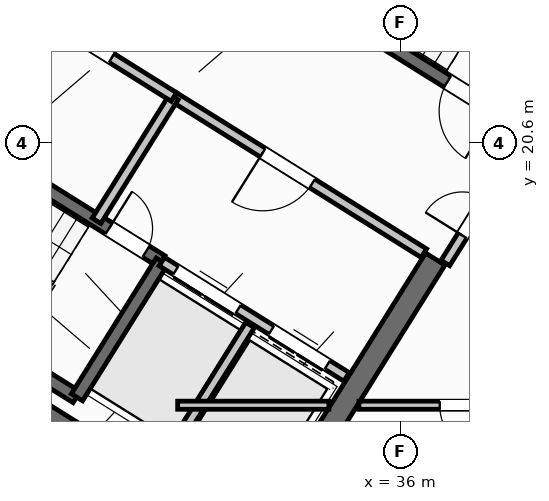
"""IFC4 building model, lengths in metres.
Left out: names, types, materials, properties, quantities, classifications, styles, units other than length and angle.
Written with IfcOpenShell. Run it as: python <this file> out.ifc"""

import sys

from ifc_helpers import new_model, si_unit, direction, frame, frame_2d, origin, place, context, subcontext, project, spatial, rectangle, extrude, source, transform, mapped, element, fill, save


model = new_model("IFC4")
c1 = context("Model", 3, precision=1e-05, world=origin(), true_north=direction((0.0, 1.0)))
c2 = subcontext(c1, "Body", "Model", "MODEL_VIEW")
j1 = project(units=[si_unit("LENGTHUNIT", "METRE"), si_unit("PLANEANGLEUNIT", "RADIAN")], contexts=[c1])
p1 = place(None, origin())
s1 = spatial("IfcSite", under=j1, at=p1, CompositionType="ELEMENT")
p2 = place(p1, origin())
s2 = spatial("IfcBuilding", under=s1, at=p2, CompositionType="ELEMENT")
p3 = place(p2, frame((0.0, 0.0, 291.6)))
s3 = spatial("IfcBuildingStorey", under=s2, at=p3, CompositionType="ELEMENT", Elevation=291.6)
p4 = place(p3, frame((33.324, 12.503, 0.0), z_axis=(0.0, 0.0, 1.0), x_axis=(-0.848043529849, 0.529926571782, 0.0)))
e1 = element("IfcWall", 1, at=p4, inside=s3, PredefinedType="SHEAR", context=c2, shape_type="SweptSolid", body=[
    extrude(rectangle(XDim=13.04, YDim=0.45, at=frame_2d((6.52, 0.0))), origin(), (0.0, 0.0, 1.0), 3.35),
])
p5 = place(p3, frame((36.683, 18.304, 0.0), z_axis=(0.0, 0.0, 1.0), x_axis=(-0.529904039071, -0.848057609704, 0.0)))
e2 = element("IfcWall", 2, at=p5, inside=s3, PredefinedType="SHEAR", context=c2, shape_type="SweptSolid", body=[
    extrude(rectangle(XDim=6.475, YDim=0.45, at=frame_2d((3.238, 0.0))), origin(), (0.0, 0.0, 1.0), 3.35),
])
p6 = place(p3, frame((29.268, 6.429, 0.0), z_axis=(0.0, 0.0, 1.0), x_axis=(-0.848048398186, 0.529918780885, 0.0)))
e3 = element("IfcWall", 3, at=p6, inside=s3, PredefinedType="STANDARD", context=c2, shape_type="SweptSolid", body=[
    extrude(rectangle(XDim=25.188, YDim=0.32, at=frame_2d((12.594, 0.0))), origin(), (0.0, 0.0, 1.0), 3.35),
])
p7 = place(p6, frame((16.362, 0.0, 0.0)))
e4 = element("IfcOpeningElement", 4, at=p7, cuts=e3, PredefinedType="OPENING", context=c2, shape_type="SweptSolid", body=[
    extrude(rectangle(XDim=1.2, YDim=2.15, at=frame_2d((0.6, 1.075))), frame((0.0, 0.17, 0.0), z_axis=(0.0, -1.0, 0.0), x_axis=(1.0, 0.0, 0.0)), (0.0, 0.0, 1.0), 0.34),
])
p8 = place(p6, frame((3.859, 0.0, 0.9)))
e5 = element("IfcOpeningElement", 5, at=p8, cuts=e3, PredefinedType="OPENING", context=c2, shape_type="SweptSolid", body=[
    extrude(rectangle(XDim=1.65, YDim=1.45, at=frame_2d((0.825, 0.725))), frame((0.0, 0.17, 0.0), z_axis=(0.0, -1.0, 0.0), x_axis=(1.0, 0.0, 0.0)), (0.0, 0.0, 1.0), 0.34),
])
p9 = place(p6, frame((10.519, 0.0, 0.9)))
e6 = element("IfcOpeningElement", 6, at=p9, cuts=e3, PredefinedType="OPENING", context=c2, shape_type="SweptSolid", body=[
    extrude(rectangle(XDim=1.65, YDim=1.45, at=frame_2d((0.825, 0.725))), frame((0.0, 0.17, 0.0), z_axis=(0.0, -1.0, 0.0), x_axis=(1.0, 0.0, 0.0)), (0.0, 0.0, 1.0), 0.34),
])
p10 = place(p6, frame((21.156, 0.0, 0.95)))
e7 = element("IfcOpeningElement", 7, at=p10, cuts=e3, PredefinedType="OPENING", context=c2, shape_type="SweptSolid", body=[
    extrude(rectangle(XDim=1.95, YDim=1.35, at=frame_2d((0.975, 0.675))), frame((0.0, 0.17, 0.0), z_axis=(0.0, -1.0, 0.0), x_axis=(1.0, 0.0, 0.0)), (0.0, 0.0, 1.0), 0.34),
])
p11 = place(p3, frame((29.605, 15.581, 0.0), z_axis=(0.0, 0.0, 1.0), x_axis=(-0.848036911448, 0.529937163087, 0.0)))
e8 = element("IfcWall", 8, at=p11, inside=s3, PredefinedType="SHEAR", context=c2, shape_type="SweptSolid", body=[
    extrude(rectangle(XDim=7.46, YDim=0.26, at=frame_2d((3.73, 0.0))), origin(), (0.0, 0.0, 1.0), 3.35),
])
p12 = place(p3, frame((31.28, 18.261, 0.0), z_axis=(0.0, 0.0, 1.0), x_axis=(-0.848051618787, 0.529913626805, 0.0)))
e9 = element("IfcWall", 9, at=p12, inside=s3, PredefinedType="SHEAR", context=c2, shape_type="SweptSolid", body=[
    extrude(rectangle(XDim=7.46, YDim=0.26, at=frame_2d((3.73, 0.0))), origin(), (0.0, 0.0, 1.0), 3.35),
])
p13 = place(p12, frame((0.36, 0.0, 0.0)))
e10 = element("IfcOpeningElement", 10, at=p13, cuts=e9, PredefinedType="OPENING", context=c2, shape_type="SweptSolid", body=[
    extrude(rectangle(XDim=0.86, YDim=2.05, at=frame_2d((0.43, 1.025))), frame((0.0, 0.14, 0.0), z_axis=(0.0, -1.0, 0.0), x_axis=(1.0, 0.0, 0.0)), (0.0, 0.0, 1.0), 0.28),
])
p14 = place(p3, frame((31.288, 18.256, 0.0), z_axis=(0.0, 0.0, 1.0), x_axis=(-0.529943379326, -0.848033026897, 0.0)))
e11 = element("IfcWall", 11, at=p14, inside=s3, PredefinedType="SHEAR", context=c2, shape_type="SweptSolid", body=[
    extrude(rectangle(XDim=3.16, YDim=0.26, at=frame_2d((1.58, 0.0))), origin(), (0.0, 0.0, 1.0), 3.35),
])
p15 = place(p3, frame((38.046, 21.108, 0.0), z_axis=(0.0, 0.0, 1.0), x_axis=(-0.848054434086, 0.529909121291, 0.0)))
e12 = element("IfcWall", 12, at=p15, inside=s3, PredefinedType="SHEAR", context=c2, shape_type="SweptSolid", body=[
    extrude(rectangle(XDim=7.33, YDim=0.26, at=frame_2d((3.665, 0.0))), origin(), (0.0, 0.0, 1.0), 3.35),
])
p16 = place(p15, frame((0.22, 0.0, 0.0)))
e13 = element("IfcOpeningElement", 13, at=p16, cuts=e12, PredefinedType="OPENING", context=c2, shape_type="SweptSolid", body=[
    extrude(rectangle(XDim=1.1, YDim=2.1, at=frame_2d((0.55, 1.05))), frame((0.0, 0.14, 0.0), z_axis=(0.0, -1.0, 0.0), x_axis=(1.0, 0.0, 0.0)), (0.0, 0.0, 1.0), 0.28),
])
p17 = place(p3, frame((34.933, 15.978, 0.0), z_axis=(0.0, 0.0, 1.0), x_axis=(-0.848055739377, 0.529907032327, 0.0)))
e14 = element("IfcWall", 14, at=p17, inside=s3, PredefinedType="STANDARD", context=c2, shape_type="SweptSolid", body=[
    extrude(rectangle(XDim=4.298, YDim=0.2, at=frame_2d((2.149, 0.0))), origin(), (0.0, 0.0, 1.0), 3.34),
])
p18 = place(p17, frame((0.448, 0.0, 0.0)))
e15 = element("IfcOpeningElement", 15, at=p18, cuts=e14, PredefinedType="OPENING", context=c2, shape_type="SweptSolid", body=[
    extrude(rectangle(XDim=1.3, YDim=2.2, at=frame_2d((0.65, 1.1))), frame((0.0, 0.11, 0.0), z_axis=(0.0, -1.0, 0.0), x_axis=(1.0, 0.0, 0.0)), (0.0, 0.0, 1.0), 0.22),
])
p19 = place(p17, frame((2.523, 0.0, 0.0)))
e16 = element("IfcOpeningElement", 16, at=p19, cuts=e14, PredefinedType="OPENING", context=c2, shape_type="SweptSolid", body=[
    extrude(rectangle(XDim=1.45, YDim=2.25, at=frame_2d((0.725, 1.125))), frame((0.0, 0.11, 0.0), z_axis=(0.0, -1.0, 0.0), x_axis=(1.0, 0.0, 0.0)), (0.0, 0.0, 1.0), 0.22),
])
p20 = place(p3, frame((36.459, 18.421, 0.0), z_axis=(0.0, 0.0, 1.0), x_axis=(-0.848059591691, 0.529900867089, 0.0)))
e17 = element("IfcWall", 17, at=p20, inside=s3, PredefinedType="STANDARD", context=c2, shape_type="SweptSolid", body=[
    extrude(rectangle(XDim=5.818, YDim=0.2, at=frame_2d((2.909, 0.0))), origin(), (0.0, 0.0, 1.0), 3.34),
])
p21 = place(p20, frame((2.598, 0.0, 0.0)))
e18 = element("IfcOpeningElement", 18, at=p21, cuts=e17, PredefinedType="OPENING", context=c2, shape_type="SweptSolid", body=[
    extrude(rectangle(XDim=1.15, YDim=2.1, at=frame_2d((0.575, 1.05))), frame((0.0, 0.11, 0.0), z_axis=(0.0, -1.0, 0.0), x_axis=(1.0, 0.0, 0.0)), (0.0, 0.0, 1.0), 0.22),
])
p22 = place(p3, frame((33.029, 17.003, 0.0), z_axis=(0.0, 0.0, 1.0), x_axis=(-0.529916267533, -0.848049968695, 0.0)))
e19 = element("IfcWall", 19, at=p22, inside=s3, PredefinedType="STANDARD", context=c2, shape_type="SweptSolid", body=[
    extrude(rectangle(XDim=2.92, YDim=0.2, at=frame_2d((1.46, 0.0))), origin(), (0.0, 0.0, 1.0), 3.34),
])
p23 = place(p3, frame((31.525, 21.504, 0.0), z_axis=(0.0, 0.0, 1.0), x_axis=(-0.529907497854, -0.848055448493, 0.0)))
e20 = element("IfcWall", 20, at=p23, inside=s3, PredefinedType="STANDARD", context=c2, shape_type="SweptSolid", body=[
    extrude(rectangle(XDim=2.88, YDim=0.2, at=frame_2d((1.44, 0.0))), origin(), (0.0, 0.0, 1.0), 3.34),
])
p24 = place(p3, frame((31.525, 21.504, 0.0), z_axis=(0.0, 0.0, 1.0), x_axis=(-0.848042066329, 0.529928913853, 0.0)))
e21 = element("IfcWall", 21, at=p24, inside=s3, PredefinedType="STANDARD", context=c2, shape_type="SweptSolid", body=[
    extrude(rectangle(XDim=6.268, YDim=0.2, at=frame_2d((3.134, 0.0))), origin(), (0.0, 0.0, 1.0), 3.34),
])
p25 = place(p24, frame((4.4, 0.0, 0.0)))
e22 = element("IfcOpeningElement", 22, at=p25, cuts=e21, PredefinedType="OPENING", context=c2, shape_type="SweptSolid", body=[
    extrude(rectangle(XDim=0.86, YDim=2.05, at=frame_2d((0.43, 1.025))), frame((0.0, 0.11, 0.0), z_axis=(0.0, -1.0, 0.0), x_axis=(1.0, 0.0, 0.0)), (0.0, 0.0, 1.0), 0.22),
])
p26 = place(p24, frame((1.45, 0.0, 0.0)))
e23 = element("IfcOpeningElement", 23, at=p26, cuts=e21, PredefinedType="OPENING", context=c2, shape_type="SweptSolid", body=[
    extrude(rectangle(XDim=0.86, YDim=2.05, at=frame_2d((0.43, 1.025))), frame((0.0, 0.11, 0.0), z_axis=(0.0, -1.0, 0.0), x_axis=(1.0, 0.0, 0.0)), (0.0, 0.0, 1.0), 0.22),
])
p27 = place(p3, frame((32.164, 10.374, 0.0), z_axis=(0.0, 0.0, 1.0), x_axis=(-0.848044107957, 0.529925646633, 0.0)))
e24 = element("IfcWall", 24, at=p27, inside=s3, PredefinedType="PARTITIONING", context=c2, shape_type="SweptSolid", body=[
    extrude(rectangle(XDim=15.57, YDim=0.16, at=frame_2d((7.785, 0.0))), origin(), (0.0, 0.0, 1.0), 3.34),
])
p28 = place(p27, frame((10.83, 0.0, 0.0)))
e25 = element("IfcOpeningElement", 25, at=p28, cuts=e24, PredefinedType="OPENING", context=c2, shape_type="SweptSolid", body=[
    extrude(rectangle(XDim=1.0, YDim=2.1, at=frame_2d((0.5, 1.05))), frame((0.0, 0.09, 0.0), z_axis=(0.0, -1.0, 0.0), x_axis=(1.0, 0.0, 0.0)), (0.0, 0.0, 1.0), 0.18),
])
p29 = place(p3, frame((29.72, 8.859, 0.0), z_axis=(0.0, 0.0, 1.0), x_axis=(-0.848049134363, 0.529917602752, 0.0)))
e26 = element("IfcWall", 26, at=p29, inside=s3, PredefinedType="PLUMBINGWALL", context=c2, shape_type="SweptSolid", body=[
    extrude(rectangle(XDim=14.3, YDim=0.14, at=frame_2d((7.15, 0.0))), origin(), (0.0, 0.0, 1.0), 3.34),
])
p30 = place(p29, frame((9.57, 0.0, 0.0)))
e27 = element("IfcOpeningElement", 27, at=p30, cuts=e26, PredefinedType="OPENING", context=c2, shape_type="SweptSolid", body=[
    extrude(rectangle(XDim=0.92, YDim=2.08, at=frame_2d((0.46, 1.04))), frame((0.0, 0.08, 0.0), z_axis=(0.0, -1.0, 0.0), x_axis=(1.0, 0.0, 0.0)), (0.0, 0.0, 1.0), 0.16),
])
p31 = place(p3, frame((38.451, 20.737, 0.0), z_axis=(0.0, 0.0, 1.0), x_axis=(-0.529924799939, -0.848044637038, 0.0)))
e28 = element("IfcWall", 28, at=p31, inside=s3, PredefinedType="STANDARD", context=c2, shape_type="SweptSolid", body=[
    extrude(rectangle(XDim=2.96, YDim=0.2, at=frame_2d((1.48, 0.0))), origin(), (0.0, 0.0, 1.0), 3.34),
])
p32 = place(p31, frame((1.46, 0.0, 0.0)))
e29 = element("IfcOpeningElement", 29, at=p32, cuts=e28, PredefinedType="OPENING", context=c2, shape_type="SweptSolid", body=[
    extrude(rectangle(XDim=0.86, YDim=2.05, at=frame_2d((0.43, 1.025))), frame((0.0, 0.11, 0.0), z_axis=(0.0, -1.0, 0.0), x_axis=(1.0, 0.0, 0.0)), (0.0, 0.0, 1.0), 0.22),
])
p33 = place(p3, frame((31.6, 15.42, 0.0), z_axis=(0.0, 0.0, 1.0), x_axis=(1.0, 0.0, 0.0)))
e30 = element("IfcWall", 30, at=p33, inside=s3, PredefinedType="PARTITIONING", context=c2, shape_type="SweptSolid", body=[
    extrude(rectangle(XDim=2.984, YDim=0.16, at=frame_2d((1.492, 0.0))), origin(), (0.0, 0.0, 1.0), 3.34),
])
p34 = place(p3, frame((35.178, 15.42, 0.0), z_axis=(0.0, 0.0, 1.0), x_axis=(1.0, 0.0, 0.0)))
e31 = element("IfcWall", 31, at=p34, inside=s3, PredefinedType="PARTITIONING", context=c2, shape_type="SweptSolid", body=[
    extrude(rectangle(XDim=9.021, YDim=0.16, at=frame_2d((4.511, 0.0))), origin(), (0.0, 0.0, 1.0), 3.34),
])
p35 = place(p34, frame((1.594, 0.0, 0.0)))
e32 = element("IfcOpeningElement", 32, at=p35, cuts=e31, PredefinedType="OPENING", context=c2, shape_type="SweptSolid", body=[
    extrude(rectangle(XDim=1.0, YDim=2.1, at=frame_2d((0.5, 1.05))), frame((0.0, 0.09, 0.0), z_axis=(0.0, -1.0, 0.0), x_axis=(1.0, 0.0, 0.0)), (0.0, 0.0, 1.0), 0.18),
])
m1 = source(origin(), c2, "Body", "SweptSolid", [
    extrude(rectangle(XDim=0.86, YDim=2.05, at=frame_2d((0.43, 1.025))), frame((0.0, 0.025, 0.0), z_axis=(0.0, -1.0, 0.0), x_axis=(1.0, 0.0, 0.0)), (0.0, 0.0, 1.0), 0.05),
])
p36 = place(p13, frame((0.86, 0.0, 0.0), z_axis=(0.0, 0.0, 1.0), x_axis=(-1.0, 0.0, 0.0)))
e33 = element("IfcDoor", 33, at=p36, inside=s3, OperationType="SINGLE_SWING_LEFT", PredefinedType="DOOR", context=c2, shape_type="MappedRepresentation", body=[
    mapped(m1, transform((0.0, 0.0, 0.0), scale=1.0)),
])
fill(e10, e33)
m2 = source(origin(), c2, "Body", "SweptSolid", [
    extrude(rectangle(XDim=1.1, YDim=2.1, at=frame_2d((0.55, 1.05))), frame((0.0, 0.025, 0.0), z_axis=(0.0, -1.0, 0.0), x_axis=(1.0, 0.0, 0.0)), (0.0, 0.0, 1.0), 0.05),
])
p37 = place(p16, origin())
e34 = element("IfcDoor", 34, at=p37, inside=s3, OperationType="SINGLE_SWING_LEFT", PredefinedType="DOOR", context=c2, shape_type="MappedRepresentation", body=[
    mapped(m2, transform((0.0, 0.0, 0.0), scale=1.0)),
])
fill(e13, e34)
m3 = source(origin(), c2, "Body", "SweptSolid", [
    extrude(rectangle(XDim=1.15, YDim=2.1, at=frame_2d((0.575, 1.05))), frame((0.0, 0.025, 0.0), z_axis=(0.0, -1.0, 0.0), x_axis=(1.0, 0.0, 0.0)), (0.0, 0.0, 1.0), 0.05),
])
p38 = place(p21, origin())
e35 = element("IfcDoor", 35, at=p38, inside=s3, OperationType="SINGLE_SWING_RIGHT", PredefinedType="DOOR", context=c2, shape_type="MappedRepresentation", body=[
    mapped(m3, transform((0.0, 0.0, 0.0), scale=1.0)),
])
fill(e18, e35)
m4 = source(origin(), c2, "Body", "SweptSolid", [
    extrude(rectangle(XDim=1.3, YDim=2.2, at=frame_2d((0.65, 1.1))), frame((0.0, 0.025, 0.0), z_axis=(0.0, -1.0, 0.0), x_axis=(1.0, 0.0, 0.0)), (0.0, 0.0, 1.0), 0.05),
])
p39 = place(p18, origin())
e36 = element("IfcDoor", 36, at=p39, inside=s3, OperationType="DOUBLE_DOOR_SLIDING", PredefinedType="DOOR", context=c2, shape_type="MappedRepresentation", body=[
    mapped(m4, transform((0.0, 0.0, 0.0), scale=1.0)),
])
fill(e15, e36)
m5 = source(origin(), c2, "Body", "SweptSolid", [
    extrude(rectangle(XDim=1.45, YDim=2.25, at=frame_2d((0.725, 1.125))), frame((0.0, 0.025, 0.0), z_axis=(0.0, -1.0, 0.0), x_axis=(1.0, 0.0, 0.0)), (0.0, 0.0, 1.0), 0.05),
])
p40 = place(p19, origin())
e37 = element("IfcDoor", 37, at=p40, inside=s3, OperationType="DOUBLE_DOOR_SLIDING", PredefinedType="DOOR", context=c2, shape_type="MappedRepresentation", body=[
    mapped(m5, transform((0.0, 0.0, 0.0), scale=1.0)),
])
fill(e16, e37)
p41 = place(p26, frame((0.86, 0.0, 0.0), z_axis=(0.0, 0.0, 1.0), x_axis=(-1.0, 0.0, 0.0)))
e38 = element("IfcDoor", 38, at=p41, inside=s3, OperationType="SINGLE_SWING_RIGHT", PredefinedType="DOOR", context=c2, shape_type="MappedRepresentation", body=[
    mapped(m1, transform((0.0, 0.0, 0.0), scale=1.0)),
])
fill(e23, e38)
p42 = place(p32, frame((0.86, 0.0, 0.0), z_axis=(0.0, 0.0, 1.0), x_axis=(-1.0, 0.0, 0.0)))
e39 = element("IfcDoor", 39, at=p42, inside=s3, OperationType="SINGLE_SWING_LEFT", PredefinedType="DOOR", context=c2, shape_type="MappedRepresentation", body=[
    mapped(m1, transform((0.0, 0.0, 0.0), scale=1.0)),
])
fill(e29, e39)
m6 = source(origin(), c2, "Body", "SweptSolid", [
    extrude(rectangle(XDim=1.0, YDim=2.1, at=frame_2d((0.5, 1.05))), frame((0.0, 0.025, 0.0), z_axis=(0.0, -1.0, 0.0), x_axis=(1.0, 0.0, 0.0)), (0.0, 0.0, 1.0), 0.05),
])
p43 = place(p35, frame((1.0, 0.0, 0.0), z_axis=(0.0, 0.0, 1.0), x_axis=(-1.0, 0.0, 0.0)))
e40 = element("IfcDoor", 40, at=p43, inside=s3, OperationType="SINGLE_SWING_LEFT", PredefinedType="DOOR", context=c2, shape_type="MappedRepresentation", body=[
    mapped(m6, transform((0.0, 0.0, 0.0), scale=1.0)),
])
fill(e32, e40)
save(model, sys.argv[1])
